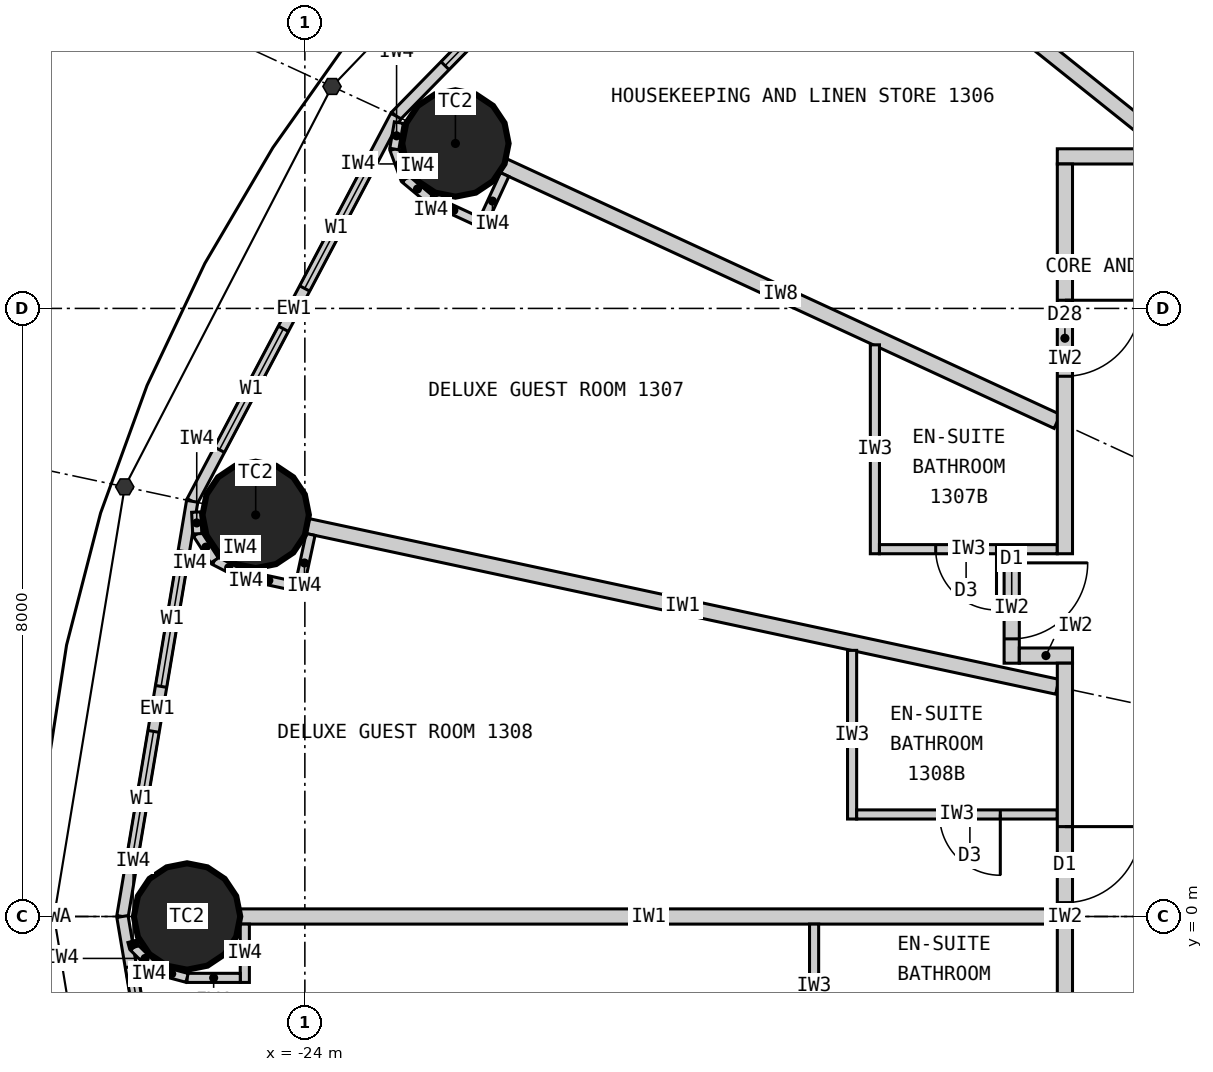
"""IFC4 building model, lengths in metres.
Left out: names, types, materials, properties, quantities, classifications, styles, units other than length and angle.
Written with IfcOpenShell. Run it as: python <this file> out.ifc"""

import sys

from ifc_helpers import new_model, si_unit, direction, frame, frame_2d, origin, origin_2d, place, context, subcontext, project, spatial, rectangle, circle, extrude, element, fill, save


model = new_model("IFC4")
c1 = context("Model", 3, precision=1e-05, world=origin(), true_north=direction((0.0, 1.0)))
c2 = subcontext(c1, "Body", "Model", "MODEL_VIEW")
j1 = project(units=[si_unit("LENGTHUNIT", "METRE"), si_unit("PLANEANGLEUNIT", "RADIAN")], contexts=[c1])
p1 = place(None, origin())
s1 = spatial("IfcSite", under=j1, at=p1, CompositionType="ELEMENT")
p2 = place(p1, origin())
s2 = spatial("IfcBuilding", under=s1, at=p2, CompositionType="ELEMENT")
p3 = place(p2, frame((0.0, 0.0, 57.3)))
s3 = spatial("IfcBuildingStorey", under=s2, at=p3, CompositionType="ELEMENT", Elevation=57.3)
for number, where, z_axis, x_axis in (
    (1, (-22.019, 10.17, 0.0), (0.0, 0.0, 1.0), (1.0, 0.0, 0.0)),
    (2, (-24.647, 5.283, 0.0), (0.0, 0.0, 1.0), (1.0, 0.0, 0.0)),
    (3, (-25.55, 0.0, 0.0), (0.0, 0.0, 1.0), (1.0, 0.0, 0.0)),
):
    element("IfcColumn", number, at=place(p3, frame(where, z_axis=z_axis, x_axis=x_axis)), inside=s3, PredefinedType="COLUMN", context=c2, shape_type="SweptSolid", body=[
        extrude(circle(Radius=0.7, at=origin_2d()), origin(), (0.0, 0.0, 1.0), 3.3),
    ])
p4 = place(p3, frame((-18.57, 14.856, 0.0), z_axis=(0.0, 0.0, 1.0), x_axis=(-0.699602905915, -0.714531856557, 0.0)))
e4 = element("IfcWall", 4, at=p4, inside=s3, PredefinedType="ELEMENTEDWALL", context=c2, shape_type="SweptSolid", body=[
    extrude(rectangle(XDim=6.051, YDim=0.15, at=frame_2d((3.025, 0.0))), origin(), (0.0, 0.0, 1.0), 3.12),
])
p5 = place(p4, frame((0.926, 0.0, 0.9)))
e5 = element("IfcOpeningElement", 5, at=p5, cuts=e4, PredefinedType="OPENING", context=c2, shape_type="SweptSolid", body=[
    extrude(rectangle(XDim=1.8, YDim=1.9, at=frame_2d((0.9, 0.95))), frame((0.0, 0.085, 0.0), z_axis=(0.0, -1.0, 0.0), x_axis=(1.0, 0.0, 0.0)), (0.0, 0.0, 1.0), 0.17),
])
p6 = place(p4, frame((3.325, 0.0, 0.9)))
e6 = element("IfcOpeningElement", 6, at=p6, cuts=e4, PredefinedType="OPENING", context=c2, shape_type="SweptSolid", body=[
    extrude(rectangle(XDim=1.8, YDim=1.9, at=frame_2d((0.9, 0.95))), frame((0.0, 0.085, 0.0), z_axis=(0.0, -1.0, 0.0), x_axis=(1.0, 0.0, 0.0)), (0.0, 0.0, 1.0), 0.17),
])
p7 = place(p3, frame((-22.803, 10.532, 0.0), z_axis=(0.0, 0.0, 1.0), x_axis=(-0.467296867008, -0.884100468321, 0.0)))
e7 = element("IfcWall", 7, at=p7, inside=s3, PredefinedType="ELEMENTEDWALL", context=c2, shape_type="SweptSolid", body=[
    extrude(rectangle(XDim=5.734, YDim=0.15, at=frame_2d((2.867, 0.0))), origin(), (0.0, 0.0, 1.0), 3.12),
])
p8 = place(p7, frame((0.767, 0.0, 0.9)))
e8 = element("IfcOpeningElement", 8, at=p8, cuts=e7, PredefinedType="OPENING", context=c2, shape_type="SweptSolid", body=[
    extrude(rectangle(XDim=1.8, YDim=1.9, at=frame_2d((0.9, 0.95))), frame((0.0, 0.085, 0.0), z_axis=(0.0, -1.0, 0.0), x_axis=(1.0, 0.0, 0.0)), (0.0, 0.0, 1.0), 0.17),
])
p9 = place(p7, frame((3.167, 0.0, 0.9)))
e9 = element("IfcOpeningElement", 9, at=p9, cuts=e7, PredefinedType="OPENING", context=c2, shape_type="SweptSolid", body=[
    extrude(rectangle(XDim=1.8, YDim=1.9, at=frame_2d((0.9, 0.95))), frame((0.0, 0.085, 0.0), z_axis=(0.0, -1.0, 0.0), x_axis=(1.0, 0.0, 0.0)), (0.0, 0.0, 1.0), 0.17),
])
p10 = place(p3, frame((-25.482, 5.462, 0.0), z_axis=(0.0, 0.0, 1.0), x_axis=(-0.165642551694, -0.986185857264, 0.0)))
e10 = element("IfcWall", 10, at=p10, inside=s3, PredefinedType="ELEMENTEDWALL", context=c2, shape_type="SweptSolid", body=[
    extrude(rectangle(XDim=5.539, YDim=0.15, at=frame_2d((2.77, 0.0))), origin(), (0.0, 0.0, 1.0), 3.12),
])
p11 = place(p10, frame((0.669, 0.0, 0.9)))
e11 = element("IfcOpeningElement", 11, at=p11, cuts=e10, PredefinedType="OPENING", context=c2, shape_type="SweptSolid", body=[
    extrude(rectangle(XDim=1.8, YDim=1.9, at=frame_2d((0.9, 0.95))), frame((0.0, 0.085, 0.0), z_axis=(0.0, -1.0, 0.0), x_axis=(1.0, 0.0, 0.0)), (0.0, 0.0, 1.0), 0.17),
])
p12 = place(p10, frame((3.07, 0.0, 0.9)))
e12 = element("IfcOpeningElement", 12, at=p12, cuts=e10, PredefinedType="OPENING", context=c2, shape_type="SweptSolid", body=[
    extrude(rectangle(XDim=1.8, YDim=1.9, at=frame_2d((0.9, 0.95))), frame((0.0, 0.085, 0.0), z_axis=(0.0, -1.0, 0.0), x_axis=(1.0, 0.0, 0.0)), (0.0, 0.0, 1.0), 0.17),
])
p13 = place(p3, frame((-26.4, 0.0, 0.0), z_axis=(0.0, 0.0, 1.0), x_axis=(0.165642551694, -0.986185857264, 0.0)))
e13 = element("IfcWall", 13, at=p13, inside=s3, PredefinedType="ELEMENTEDWALL", context=c2, shape_type="SweptSolid", body=[
    extrude(rectangle(XDim=5.539, YDim=0.15, at=frame_2d((2.77, 0.0))), origin(), (0.0, 0.0, 1.0), 3.12),
])
p14 = place(p13, frame((0.669, 0.0, 0.9)))
e14 = element("IfcOpeningElement", 14, at=p14, cuts=e13, PredefinedType="OPENING", context=c2, shape_type="SweptSolid", body=[
    extrude(rectangle(XDim=1.8, YDim=1.9, at=frame_2d((0.9, 0.95))), frame((0.0, 0.085, 0.0), z_axis=(0.0, -1.0, 0.0), x_axis=(1.0, 0.0, 0.0)), (0.0, 0.0, 1.0), 0.17),
])
p15 = place(p13, frame((3.07, 0.0, 0.9)))
e15 = element("IfcOpeningElement", 15, at=p15, cuts=e13, PredefinedType="OPENING", context=c2, shape_type="SweptSolid", body=[
    extrude(rectangle(XDim=1.8, YDim=1.9, at=frame_2d((0.9, 0.95))), frame((0.0, 0.085, 0.0), z_axis=(0.0, -1.0, 0.0), x_axis=(1.0, 0.0, 0.0)), (0.0, 0.0, 1.0), 0.17),
])
p16 = place(p3, frame((-12.625, 10.1, 0.0), z_axis=(0.0, 0.0, 1.0), x_axis=(-0.780892451574, 0.624665493744, 0.0)))
e16 = element("IfcWall", 16, at=p16, inside=s3, PredefinedType="PARTITIONING", context=c2, shape_type="SweptSolid", body=[
    extrude(rectangle(XDim=6.045, YDim=0.2, at=frame_2d((3.022, 0.0))), origin(), (0.0, 0.0, 1.0), 2.32),
])
p17 = place(p3, frame((-14.1, 6.512, 0.0), z_axis=(0.0, 0.0, 1.0), x_axis=(-0.907832871056, 0.419332181247, 0.0)))
e17 = element("IfcWall", 17, at=p17, inside=s3, PredefinedType="PARTITIONING", context=c2, shape_type="SweptSolid", body=[
    extrude(rectangle(XDim=8.023, YDim=0.2, at=frame_2d((4.011, 0.0))), origin(), (0.0, 0.0, 1.0), 2.32),
])
p18 = place(p3, frame((-14.1, 3.022, 0.0), z_axis=(0.0, 0.0, 1.0), x_axis=(-0.977790014929, 0.209586943072, 0.0)))
e18 = element("IfcWall", 18, at=p18, inside=s3, PredefinedType="PARTITIONING", context=c2, shape_type="SweptSolid", body=[
    extrude(rectangle(XDim=10.087, YDim=0.2, at=frame_2d((5.043, 0.0))), origin(), (0.0, 0.0, 1.0), 2.32),
])
p19 = place(p3, frame((-14.1, 0.0, 0.0), z_axis=(0.0, 0.0, 1.0), x_axis=(-1.0, 0.0, 0.0)))
e19 = element("IfcWall", 19, at=p19, inside=s3, PredefinedType="PARTITIONING", context=c2, shape_type="SweptSolid", body=[
    extrude(rectangle(XDim=10.75, YDim=0.2, at=frame_2d((5.375, 0.0))), origin(), (0.0, 0.0, 1.0), 2.27),
])
p20 = place(p3, frame((-16.5, 7.521, 0.0), z_axis=(0.0, 0.0, 1.0), x_axis=(0.0, -1.0, 0.0)))
e20 = element("IfcWall", 20, at=p20, inside=s3, PredefinedType="PARTITIONING", context=c2, shape_type="SweptSolid", body=[
    extrude(rectangle(XDim=2.749, YDim=0.12, at=frame_2d((1.374, 0.0))), origin(), (0.0, 0.0, 1.0), 3.12),
])
p21 = place(p3, frame((-14.1, 4.833, 0.0), z_axis=(0.0, 0.0, 1.0), x_axis=(-1.0, 0.0, 0.0)))
e21 = element("IfcWall", 21, at=p21, inside=s3, PredefinedType="PARTITIONING", context=c2, shape_type="SweptSolid", body=[
    extrude(rectangle(XDim=2.34, YDim=0.12, at=frame_2d((1.17, 0.0))), origin(), (0.0, 0.0, 1.0), 3.12),
])
p22 = place(p21, frame((0.8, 0.0, 0.0)))
e22 = element("IfcOpeningElement", 22, at=p22, cuts=e21, PredefinedType="OPENING", context=c2, shape_type="SweptSolid", body=[
    extrude(rectangle(XDim=0.8, YDim=2.1, at=frame_2d((0.4, 1.05))), frame((0.0, 0.07, 0.0), z_axis=(0.0, -1.0, 0.0), x_axis=(1.0, 0.0, 0.0)), (0.0, 0.0, 1.0), 0.14),
])
p23 = place(p3, frame((-16.8, 3.501, 0.0), z_axis=(0.0, 0.0, 1.0), x_axis=(0.0, -1.0, 0.0)))
e23 = element("IfcWall", 23, at=p23, inside=s3, PredefinedType="PARTITIONING", context=c2, shape_type="SweptSolid", body=[
    extrude(rectangle(XDim=2.219, YDim=0.12, at=frame_2d((1.109, 0.0))), origin(), (0.0, 0.0, 1.0), 3.12),
])
p24 = place(p3, frame((-14.1, 1.343, 0.0), z_axis=(0.0, 0.0, 1.0), x_axis=(-1.0, 0.0, 0.0)))
e24 = element("IfcWall", 24, at=p24, inside=s3, PredefinedType="PARTITIONING", context=c2, shape_type="SweptSolid", body=[
    extrude(rectangle(XDim=2.64, YDim=0.12, at=frame_2d((1.32, 0.0))), origin(), (0.0, 0.0, 1.0), 3.12),
])
p25 = place(p24, frame((0.75, 0.0, 0.0)))
e25 = element("IfcOpeningElement", 25, at=p25, cuts=e24, PredefinedType="OPENING", context=c2, shape_type="SweptSolid", body=[
    extrude(rectangle(XDim=0.8, YDim=2.1, at=frame_2d((0.4, 1.05))), frame((0.0, 0.07, 0.0), z_axis=(0.0, -1.0, 0.0), x_axis=(1.0, 0.0, 0.0)), (0.0, 0.0, 1.0), 0.14),
])
p26 = place(p3, frame((-17.3, -0.1, 0.0), z_axis=(0.0, 0.0, 1.0), x_axis=(0.0, -1.0, 0.0)))
e26 = element("IfcWall", 26, at=p26, inside=s3, PredefinedType="PARTITIONING", context=c2, shape_type="SweptSolid", body=[
    extrude(rectangle(XDim=1.64, YDim=0.12, at=frame_2d((0.82, 0.0))), origin(), (0.0, 0.0, 1.0), 3.12),
])
p27 = place(p3, frame((-14.7, 4.772, 0.0), z_axis=(0.0, 0.0, 1.0), x_axis=(0.0, -1.0, 0.0)))
e27 = element("IfcWall", 27, at=p27, inside=s3, PredefinedType="PARTITIONING", context=c2, shape_type="SweptSolid", body=[
    extrude(rectangle(XDim=1.44, YDim=0.2, at=frame_2d((0.72, 0.0))), origin(), (0.0, 0.0, 1.0), 3.12),
])
p28 = place(p27, frame((0.12, 0.0, 0.0)))
e28 = element("IfcOpeningElement", 28, at=p28, cuts=e27, PredefinedType="OPENING", context=c2, shape_type="SweptSolid", body=[
    extrude(rectangle(XDim=1.0, YDim=2.2, at=frame_2d((0.5, 1.1))), frame((0.0, 0.11, 0.0), z_axis=(0.0, -1.0, 0.0), x_axis=(1.0, 0.0, 0.0)), (0.0, 0.0, 1.0), 0.22),
])
p29 = place(p3, frame((-13.9, 3.433, 0.0), z_axis=(0.0, 0.0, 1.0), x_axis=(-1.0, 0.0, 0.0)))
e29 = element("IfcWall", 29, at=p29, inside=s3, PredefinedType="PARTITIONING", context=c2, shape_type="SweptSolid", body=[
    extrude(rectangle(XDim=0.7, YDim=0.2, at=frame_2d((0.35, 0.0))), origin(), (0.0, 0.0, 1.0), 2.32),
])
p30 = place(p3, frame((-14.1, 10.0, 0.0), z_axis=(0.0, 0.0, 1.0), x_axis=(1.0, 0.0, 0.0)))
e30 = element("IfcWall", 30, at=p30, inside=s3, PredefinedType="PARTITIONING", context=c2, shape_type="SweptSolid", body=[
    extrude(rectangle(XDim=4.931, YDim=0.2, at=frame_2d((2.466, 0.0))), origin(), (0.0, 0.0, 1.0), 3.12),
])
p31 = place(p3, frame((-14.0, 9.9, 0.0), z_axis=(0.0, 0.0, 1.0), x_axis=(0.0, -1.0, 0.0)))
e31 = element("IfcWall", 31, at=p31, inside=s3, PredefinedType="PARTITIONING", context=c2, shape_type="SweptSolid", body=[
    extrude(rectangle(XDim=5.127, YDim=0.2, at=frame_2d((2.564, 0.0))), origin(), (0.0, 0.0, 1.0), 3.12),
])
p32 = place(p31, frame((1.792, 0.0, 0.0)))
e32 = element("IfcOpeningElement", 32, at=p32, cuts=e31, PredefinedType="OPENING", context=c2, shape_type="SweptSolid", body=[
    extrude(rectangle(XDim=1.0, YDim=2.2, at=frame_2d((0.5, 1.1))), frame((0.0, 0.11, 0.0), z_axis=(0.0, -1.0, 0.0), x_axis=(1.0, 0.0, 0.0)), (0.0, 0.0, 1.0), 0.22),
])
p33 = place(p3, frame((-14.0, 3.333, 0.0), z_axis=(0.0, 0.0, 1.0), x_axis=(0.0, -1.0, 0.0)))
e33 = element("IfcWall", 33, at=p33, inside=s3, PredefinedType="PARTITIONING", context=c2, shape_type="SweptSolid", body=[
    extrude(rectangle(XDim=6.665, YDim=0.2, at=frame_2d((3.333, 0.0))), origin(), (0.0, 0.0, 1.0), 3.12),
])
p34 = place(p33, frame((2.15, 0.0, 0.0)))
e34 = element("IfcOpeningElement", 34, at=p34, cuts=e33, PredefinedType="OPENING", context=c2, shape_type="SweptSolid", body=[
    extrude(rectangle(XDim=1.0, YDim=2.2, at=frame_2d((0.5, 1.1))), frame((0.0, 0.11, 0.0), z_axis=(0.0, -1.0, 0.0), x_axis=(1.0, 0.0, 0.0)), (0.0, 0.0, 1.0), 0.22),
])
p35 = place(p33, frame((5.173, 0.0, 0.0)))
e35 = element("IfcOpeningElement", 35, at=p35, cuts=e33, PredefinedType="OPENING", context=c2, shape_type="SweptSolid", body=[
    extrude(rectangle(XDim=1.0, YDim=2.2, at=frame_2d((0.5, 1.1))), frame((0.0, 0.11, 0.0), z_axis=(0.0, -1.0, 0.0), x_axis=(1.0, 0.0, 0.0)), (0.0, 0.0, 1.0), 0.22),
])
p36 = place(p3, frame((-21.371, 9.761, 0.0), z_axis=(0.0, 0.0, 1.0), x_axis=(-0.419259891039, -0.907866258744, 0.0)))
e36 = element("IfcWall", 36, at=p36, inside=s3, PredefinedType="PARTITIONING", context=c2, shape_type="SweptSolid", body=[
    extrude(rectangle(XDim=0.768, YDim=0.12, at=frame_2d((0.384, 0.0))), origin(), (0.0, 0.0, 1.0), 3.12),
])
p37 = place(p3, frame((-21.722, 9.144, 0.0), z_axis=(0.0, 0.0, 1.0), x_axis=(-0.907877701396, 0.419235112208, 0.0)))
e37 = element("IfcWall", 37, at=p37, inside=s3, PredefinedType="PARTITIONING", context=c2, shape_type="SweptSolid", body=[
    extrude(rectangle(XDim=0.7, YDim=0.12, at=frame_2d((0.35, 0.0))), origin(), (0.0, 0.0, 1.0), 3.12),
])
p38 = place(p3, frame((-22.358, 9.437, 0.0), z_axis=(0.0, 0.0, 1.0), x_axis=(-0.768412687942, 0.639954639806, 0.0)))
e38 = element("IfcWall", 38, at=p38, inside=s3, PredefinedType="PARTITIONING", context=c2, shape_type="SweptSolid", body=[
    extrude(rectangle(XDim=0.418, YDim=0.12, at=frame_2d((0.209, 0.0))), origin(), (0.0, 0.0, 1.0), 3.12),
])
p39 = place(p3, frame((-22.679, 9.705, 0.0), z_axis=(0.0, 0.0, 1.0), x_axis=(-0.345164001646, 0.938542386879, 0.0)))
e39 = element("IfcWall", 39, at=p39, inside=s3, PredefinedType="PARTITIONING", context=c2, shape_type="SweptSolid", body=[
    extrude(rectangle(XDim=0.418, YDim=0.12, at=frame_2d((0.209, 0.0))), origin(), (0.0, 0.0, 1.0), 3.12),
])
p40 = place(p3, frame((-22.823, 10.097, 0.0), z_axis=(0.0, 0.0, 1.0), x_axis=(0.169674995186, 0.985500074079, 0.0)))
e40 = element("IfcWall", 40, at=p40, inside=s3, PredefinedType="PARTITIONING", context=c2, shape_type="SweptSolid", body=[
    extrude(rectangle(XDim=0.353, YDim=0.12, at=frame_2d((0.176, 0.0))), origin(), (0.0, 0.0, 1.0), 3.12),
])
p41 = place(p3, frame((-23.925, 5.026, 0.0), z_axis=(0.0, 0.0, 1.0), x_axis=(-0.209681192172, -0.977769808109, 0.0)))
e41 = element("IfcWall", 41, at=p41, inside=s3, PredefinedType="PARTITIONING", context=c2, shape_type="SweptSolid", body=[
    extrude(rectangle(XDim=0.767, YDim=0.12, at=frame_2d((0.384, 0.0))), origin(), (0.0, 0.0, 1.0), 3.12),
])
p42 = place(p3, frame((-24.132, 4.347, 0.0), z_axis=(0.0, 0.0, 1.0), x_axis=(-0.977776882509, 0.209648200638, 0.0)))
e42 = element("IfcWall", 42, at=p42, inside=s3, PredefinedType="PARTITIONING", context=c2, shape_type="SweptSolid", body=[
    extrude(rectangle(XDim=0.7, YDim=0.12, at=frame_2d((0.35, 0.0))), origin(), (0.0, 0.0, 1.0), 3.12),
])
for number, where, z_axis, x_axis in (
    (43, (-24.816, 4.494, 0.0), (0.0, 0.0, 1.0), (-0.89, 0.455, 0.0)),
    (44, (-25.188, 4.684, 0.0), (0.0, 0.0, 1.0), (-0.543, 0.84, 0.0)),
):
    element("IfcWall", number, at=place(p3, frame(where, z_axis=z_axis, x_axis=x_axis)), inside=s3, PredefinedType="PARTITIONING", context=c2, shape_type="SweptSolid", body=[
        extrude(rectangle(XDim=0.418, YDim=0.12, at=frame_2d((0.209, 0.0))), origin(), (0.0, 0.0, 1.0), 3.12),
    ])
p43 = place(p3, frame((-25.416, 5.035, 0.0), z_axis=(0.0, 0.0, 1.0), x_axis=(-0.050406329159, 0.998728793007, 0.0)))
e45 = element("IfcWall", 45, at=p43, inside=s3, PredefinedType="PARTITIONING", context=c2, shape_type="SweptSolid", body=[
    extrude(rectangle(XDim=0.286, YDim=0.12, at=frame_2d((0.143, 0.0))), origin(), (0.0, 0.0, 1.0), 3.12),
])
p44 = place(p3, frame((-24.79, -0.1, 0.0), z_axis=(0.0, 0.0, 1.0), x_axis=(0.0, -1.0, 0.0)))
e46 = element("IfcWall", 46, at=p44, inside=s3, PredefinedType="PARTITIONING", context=c2, shape_type="SweptSolid", body=[
    extrude(rectangle(XDim=0.767, YDim=0.12, at=frame_2d((0.384, 0.0))), origin(), (0.0, 0.0, 1.0), 3.12),
])
p45 = place(p3, frame((-24.85, -0.808, 0.0), z_axis=(0.0, 0.0, 1.0), x_axis=(-1.0, 0.0, 0.0)))
e47 = element("IfcWall", 47, at=p45, inside=s3, PredefinedType="PARTITIONING", context=c2, shape_type="SweptSolid", body=[
    extrude(rectangle(XDim=0.7, YDim=0.12, at=frame_2d((0.35, 0.0))), origin(), (0.0, 0.0, 1.0), 3.12),
])
p46 = place(p3, frame((-25.55, -0.808, 0.0), z_axis=(0.0, 0.0, 1.0), x_axis=(-0.965807183573, 0.2592614205, 0.0)))
e48 = element("IfcWall", 48, at=p46, inside=s3, PredefinedType="PARTITIONING", context=c2, shape_type="SweptSolid", body=[
    extrude(rectangle(XDim=0.418, YDim=0.12, at=frame_2d((0.209, 0.0))), origin(), (0.0, 0.0, 1.0), 3.12),
])
p47 = place(p3, frame((-25.954, -0.699, 0.0), z_axis=(0.0, 0.0, 1.0), x_axis=(-0.707106781187, 0.707106781187, 0.0)))
e49 = element("IfcWall", 49, at=p47, inside=s3, PredefinedType="PARTITIONING", context=c2, shape_type="SweptSolid", body=[
    extrude(rectangle(XDim=0.418, YDim=0.12, at=frame_2d((0.209, 0.0))), origin(), (0.0, 0.0, 1.0), 3.12),
])
p48 = place(p3, frame((-26.249, -0.404, 0.0), z_axis=(0.0, 0.0, 1.0), x_axis=(-0.259754282609, 0.965674744759, 0.0)))
e50 = element("IfcWall", 50, at=p48, inside=s3, PredefinedType="PARTITIONING", context=c2, shape_type="SweptSolid", body=[
    extrude(rectangle(XDim=0.08, YDim=0.12, at=frame_2d((0.04, 0.0))), origin(), (0.0, 0.0, 1.0), 3.12),
])
p49 = place(p6, origin())
e51 = element("IfcWindow", 51, at=p49, inside=s3, PartitioningType="SINGLE_PANEL", PredefinedType="WINDOW", context=c2, shape_type="SweptSolid", body=[
    extrude(rectangle(XDim=1.8, YDim=1.9, at=frame_2d((0.9, 0.95))), frame((0.0, 0.03, 0.0), z_axis=(0.0, -1.0, 0.0), x_axis=(1.0, 0.0, 0.0)), (0.0, 0.0, 1.0), 0.06),
])
fill(e6, e51)
p50 = place(p8, origin())
e52 = element("IfcWindow", 52, at=p50, inside=s3, PartitioningType="SINGLE_PANEL", PredefinedType="WINDOW", context=c2, shape_type="SweptSolid", body=[
    extrude(rectangle(XDim=1.8, YDim=1.9, at=frame_2d((0.9, 0.95))), frame((0.0, 0.03, 0.0), z_axis=(0.0, -1.0, 0.0), x_axis=(1.0, 0.0, 0.0)), (0.0, 0.0, 1.0), 0.06),
])
fill(e8, e52)
p51 = place(p9, origin())
e53 = element("IfcWindow", 53, at=p51, inside=s3, PartitioningType="SINGLE_PANEL", PredefinedType="WINDOW", context=c2, shape_type="SweptSolid", body=[
    extrude(rectangle(XDim=1.8, YDim=1.9, at=frame_2d((0.9, 0.95))), frame((0.0, 0.03, 0.0), z_axis=(0.0, -1.0, 0.0), x_axis=(1.0, 0.0, 0.0)), (0.0, 0.0, 1.0), 0.06),
])
fill(e9, e53)
p52 = place(p11, origin())
e54 = element("IfcWindow", 54, at=p52, inside=s3, PartitioningType="SINGLE_PANEL", PredefinedType="WINDOW", context=c2, shape_type="SweptSolid", body=[
    extrude(rectangle(XDim=1.8, YDim=1.9, at=frame_2d((0.9, 0.95))), frame((0.0, 0.03, 0.0), z_axis=(0.0, -1.0, 0.0), x_axis=(1.0, 0.0, 0.0)), (0.0, 0.0, 1.0), 0.06),
])
fill(e11, e54)
p53 = place(p12, origin())
e55 = element("IfcWindow", 55, at=p53, inside=s3, PartitioningType="SINGLE_PANEL", PredefinedType="WINDOW", context=c2, shape_type="SweptSolid", body=[
    extrude(rectangle(XDim=1.8, YDim=1.9, at=frame_2d((0.9, 0.95))), frame((0.0, 0.03, 0.0), z_axis=(0.0, -1.0, 0.0), x_axis=(1.0, 0.0, 0.0)), (0.0, 0.0, 1.0), 0.06),
])
fill(e12, e55)
p54 = place(p14, origin())
e56 = element("IfcWindow", 56, at=p54, inside=s3, PartitioningType="SINGLE_PANEL", PredefinedType="WINDOW", context=c2, shape_type="SweptSolid", body=[
    extrude(rectangle(XDim=1.8, YDim=1.9, at=frame_2d((0.9, 0.95))), frame((0.0, 0.03, 0.0), z_axis=(0.0, -1.0, 0.0), x_axis=(1.0, 0.0, 0.0)), (0.0, 0.0, 1.0), 0.06),
])
fill(e14, e56)
p55 = place(p32, origin())
e57 = element("IfcDoor", 57, at=p55, inside=s3, OperationType="SINGLE_SWING_LEFT", PredefinedType="DOOR", context=c2, shape_type="SweptSolid", body=[
    extrude(rectangle(XDim=1.0, YDim=2.2, at=frame_2d((0.5, 1.1))), frame((0.0, 0.025, 0.0), z_axis=(0.0, -1.0, 0.0), x_axis=(1.0, 0.0, 0.0)), (0.0, 0.0, 1.0), 0.05),
])
fill(e32, e57)
p56 = place(p22, origin())
e58 = element("IfcDoor", 58, at=p56, inside=s3, OperationType="SINGLE_SWING_LEFT", PredefinedType="DOOR", context=c2, shape_type="SweptSolid", body=[
    extrude(rectangle(XDim=0.8, YDim=2.1, at=frame_2d((0.4, 1.05))), frame((0.0, 0.025, 0.0), z_axis=(0.0, -1.0, 0.0), x_axis=(1.0, 0.0, 0.0)), (0.0, 0.0, 1.0), 0.05),
])
fill(e22, e58)
p57 = place(p28, origin())
e59 = element("IfcDoor", 59, at=p57, inside=s3, OperationType="SINGLE_SWING_LEFT", PredefinedType="DOOR", context=c2, shape_type="SweptSolid", body=[
    extrude(rectangle(XDim=1.0, YDim=2.2, at=frame_2d((0.5, 1.1))), frame((0.0, 0.025, 0.0), z_axis=(0.0, -1.0, 0.0), x_axis=(1.0, 0.0, 0.0)), (0.0, 0.0, 1.0), 0.05),
])
fill(e28, e59)
p58 = place(p25, origin())
e60 = element("IfcDoor", 60, at=p58, inside=s3, OperationType="SINGLE_SWING_LEFT", PredefinedType="DOOR", context=c2, shape_type="SweptSolid", body=[
    extrude(rectangle(XDim=0.8, YDim=2.1, at=frame_2d((0.4, 1.05))), frame((0.0, 0.025, 0.0), z_axis=(0.0, -1.0, 0.0), x_axis=(1.0, 0.0, 0.0)), (0.0, 0.0, 1.0), 0.05),
])
fill(e25, e60)
p59 = place(p34, origin())
e61 = element("IfcDoor", 61, at=p59, inside=s3, OperationType="SINGLE_SWING_LEFT", PredefinedType="DOOR", context=c2, shape_type="SweptSolid", body=[
    extrude(rectangle(XDim=1.0, YDim=2.2, at=frame_2d((0.5, 1.1))), frame((0.0, 0.025, 0.0), z_axis=(0.0, -1.0, 0.0), x_axis=(1.0, 0.0, 0.0)), (0.0, 0.0, 1.0), 0.05),
])
fill(e34, e61)
save(model, sys.argv[1])
